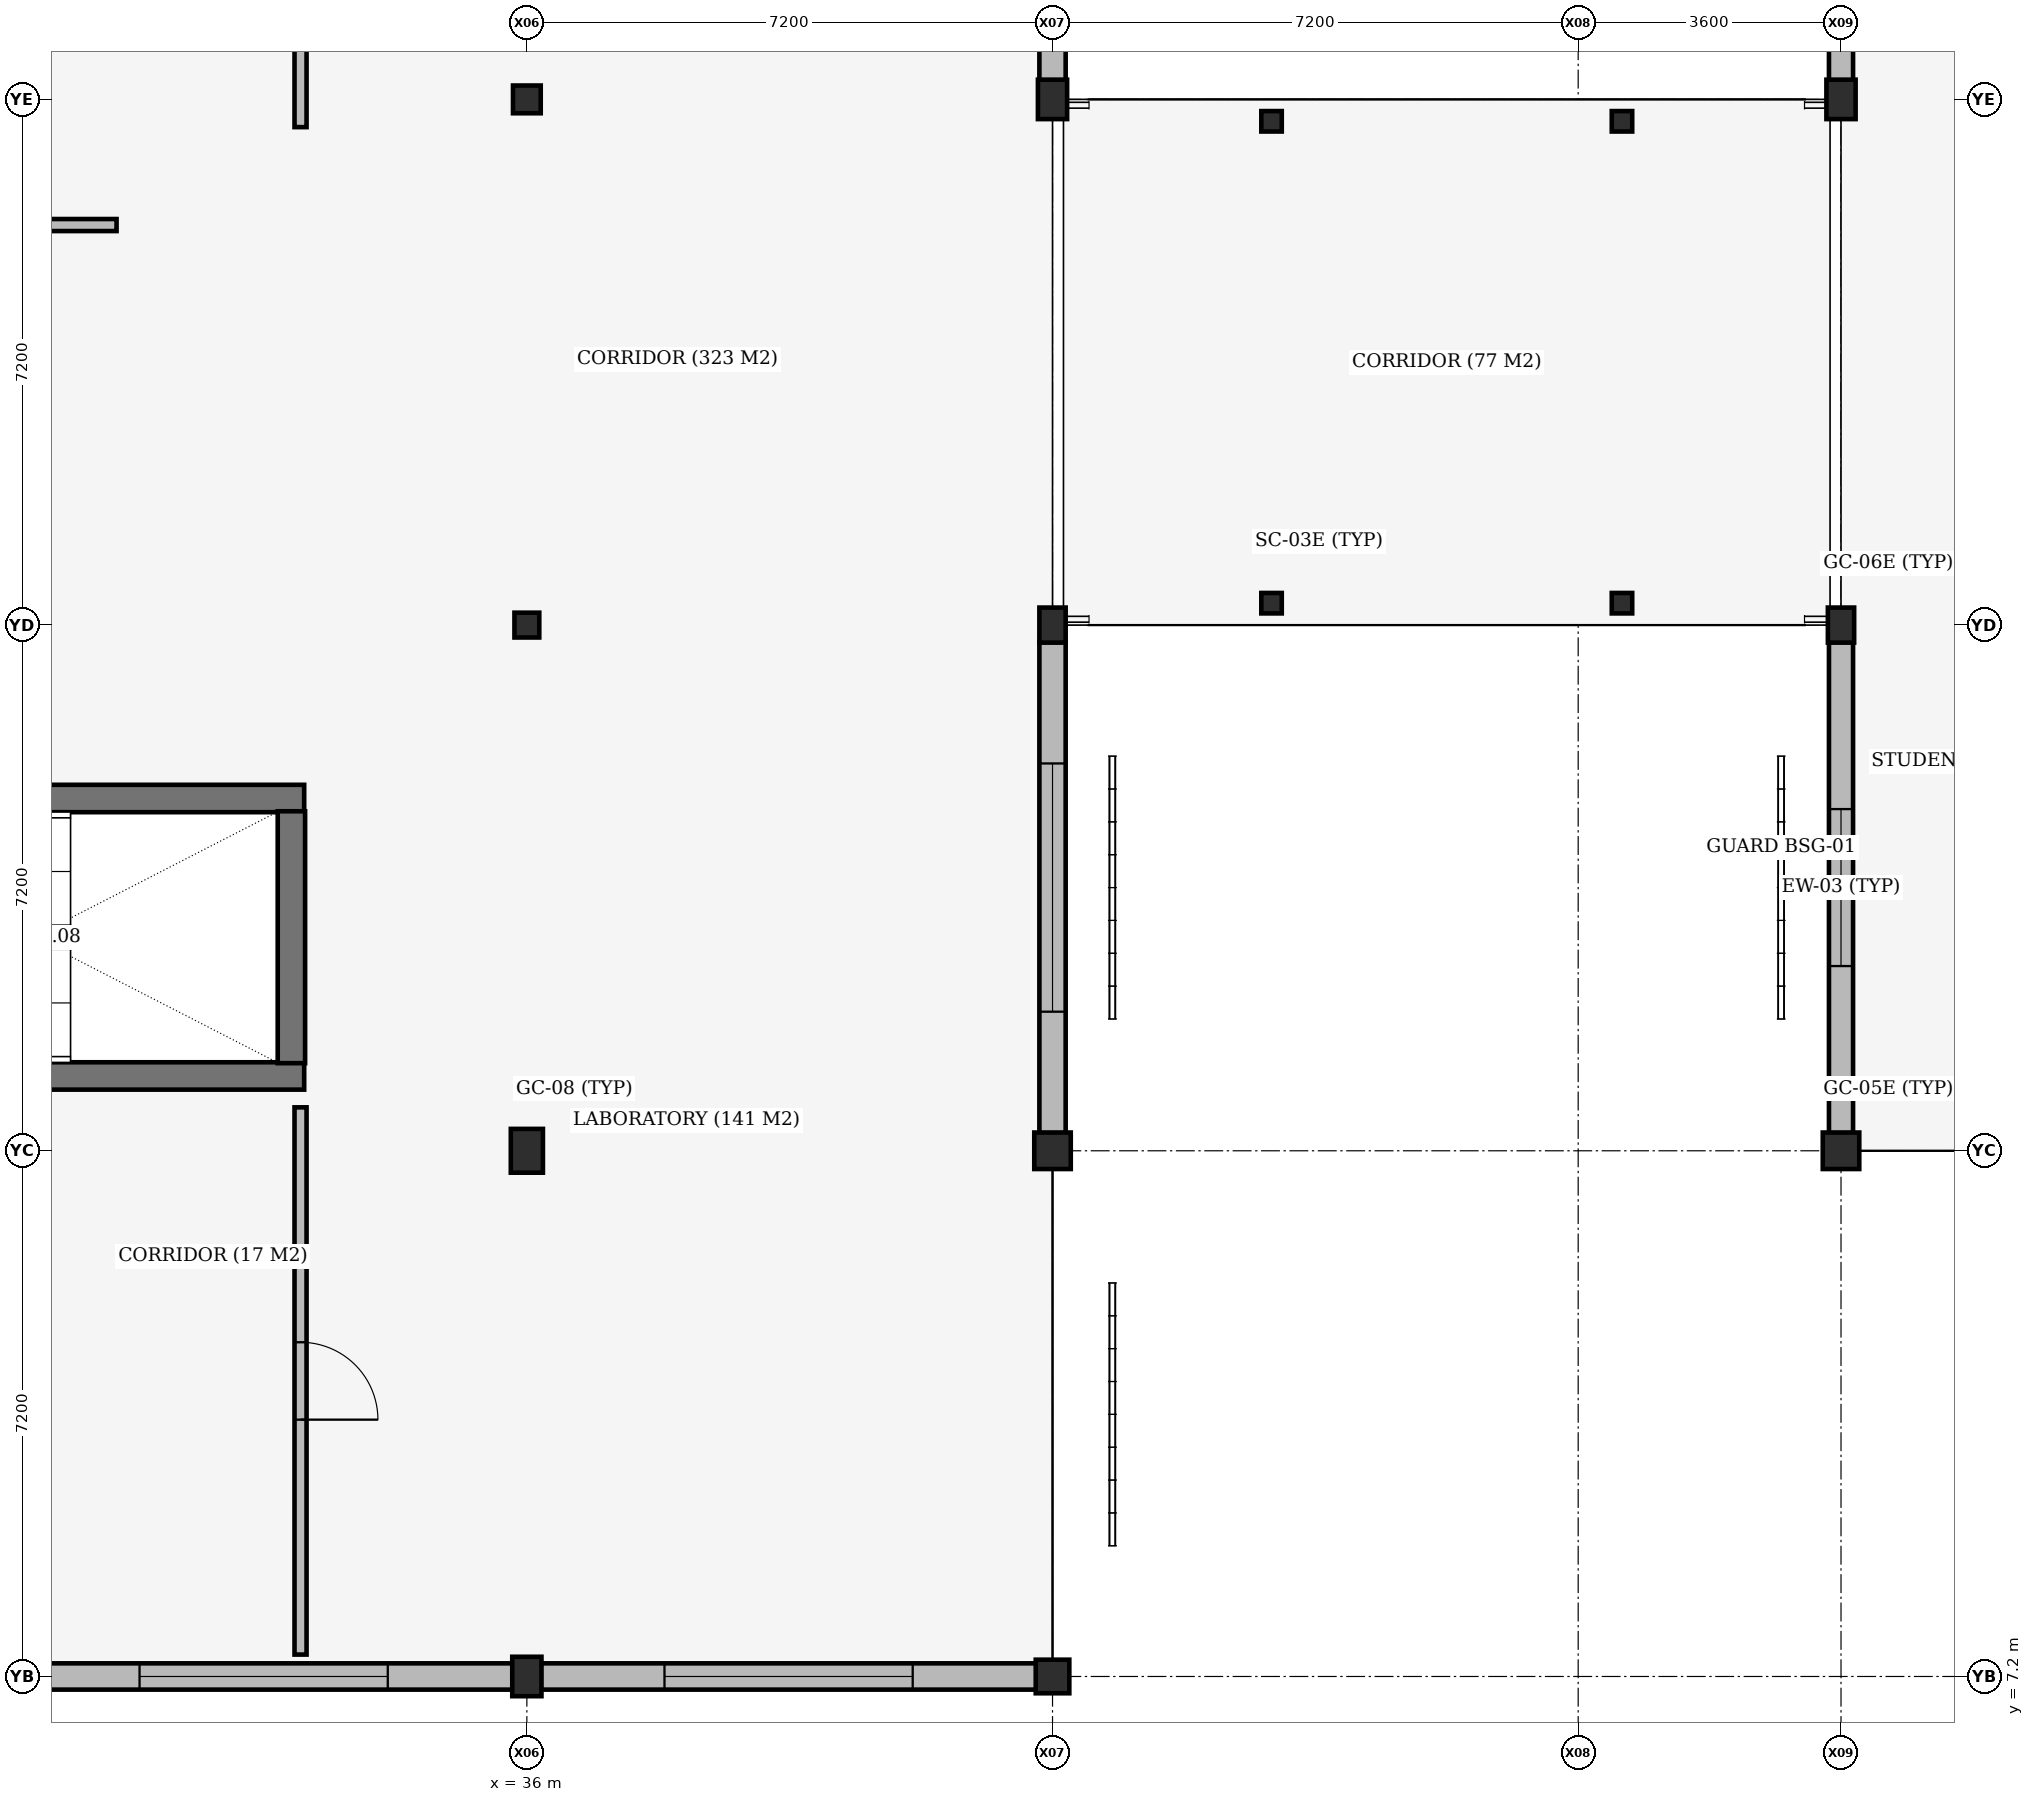
"""IFC4 building model, lengths in metres.
Left out: names, types, materials, properties, quantities, classifications, styles, units other than length and angle.
Written with IfcOpenShell. Run it as: python <this file> out.ifc"""

import sys

from ifc_helpers import new_model, si_unit, direction, frame, frame_2d, origin, origin_2d, place, context, subcontext, project, spatial, rectangle, i_section, extrude, element, fill, save


model = new_model("IFC4")
c1 = context("Model", 3, precision=1e-05, world=origin(), true_north=direction((0.0, 1.0)))
c2 = subcontext(c1, "Body", "Model", "MODEL_VIEW")
j1 = project(units=[si_unit("LENGTHUNIT", "METRE"), si_unit("PLANEANGLEUNIT", "RADIAN")], contexts=[c1])
p1 = place(None, origin())
s1 = spatial("IfcSite", under=j1, at=p1, CompositionType="ELEMENT")
p2 = place(p1, origin())
s2 = spatial("IfcBuilding", under=s1, at=p2, CompositionType="ELEMENT")
p3 = place(p2, frame((0.0, 0.0, 9.6)))
s3 = spatial("IfcBuildingStorey", under=s2, at=p3, CompositionType="ELEMENT", Elevation=9.6)
p4 = place(p3, frame((54.0, 14.4, 0.0), z_axis=(0.0, 0.0, 1.0), x_axis=(1.0, 0.0, 0.0)))
e1 = element("IfcColumn", 1, at=p4, inside=s3, PredefinedType="COLUMN", context=c2, shape_type="SweptSolid", body=[
    extrude(rectangle(XDim=0.5, YDim=0.5, at=origin_2d()), origin(), (0.0, 0.0, 1.0), 3.96),
])
p5 = place(p3, frame((54.0, 21.6, 0.0), z_axis=(0.0, 0.0, 1.0), x_axis=(1.0, 0.0, 0.0)))
e2 = element("IfcColumn", 2, at=p5, inside=s3, PredefinedType="COLUMN", context=c2, shape_type="SweptSolid", body=[
    extrude(rectangle(XDim=0.36, YDim=0.48, at=origin_2d()), origin(), (0.0, 0.0, 1.0), 3.935),
])
p6 = place(p3, frame((54.0, 28.8, 0.0), z_axis=(0.0, 0.0, 1.0), x_axis=(1.0, 0.0, 0.0)))
e3 = element("IfcColumn", 3, at=p6, inside=s3, PredefinedType="COLUMN", context=c2, shape_type="SweptSolid", body=[
    extrude(rectangle(XDim=0.4, YDim=0.54, at=origin_2d()), origin(), (0.0, 0.0, 1.0), 3.935),
])
p7 = place(p3, frame((36.0, 7.2, 0.0), z_axis=(0.0, 0.0, 1.0), x_axis=(1.0, 0.0, 0.0)))
e4 = element("IfcColumn", 4, at=p7, inside=s3, PredefinedType="COLUMN", context=c2, shape_type="SweptSolid", body=[
    extrude(rectangle(XDim=0.4, YDim=0.54, at=origin_2d()), origin(), (0.0, 0.0, 1.0), 3.89),
])
p8 = place(p3, frame((36.0, 14.4, 0.0), z_axis=(0.0, 0.0, 1.0), x_axis=(1.0, 0.0, 0.0)))
e5 = element("IfcColumn", 5, at=p8, inside=s3, PredefinedType="COLUMN", context=c2, shape_type="SweptSolid", body=[
    extrude(rectangle(XDim=0.44, YDim=0.6, at=origin_2d()), origin(), (0.0, 0.0, 1.0), 3.89),
])
p9 = place(p3, frame((36.0, 21.6, 0.0), z_axis=(0.0, 0.0, 1.0), x_axis=(1.0, 0.0, 0.0)))
e6 = element("IfcColumn", 6, at=p9, inside=s3, PredefinedType="COLUMN", context=c2, shape_type="SweptSolid", body=[
    extrude(rectangle(XDim=0.34, YDim=0.34, at=origin_2d()), origin(), (0.0, 0.0, 1.0), 3.89),
])
p10 = place(p3, frame((36.0, 28.8, 0.0), z_axis=(0.0, 0.0, 1.0), x_axis=(1.0, 0.0, 0.0)))
e7 = element("IfcColumn", 7, at=p10, inside=s3, PredefinedType="COLUMN", context=c2, shape_type="SweptSolid", body=[
    extrude(rectangle(XDim=0.38, YDim=0.38, at=origin_2d()), origin(), (0.0, 0.0, 1.0), 3.89),
])
p11 = place(p3, frame((43.2, 7.2, 0.0), z_axis=(0.0, 0.0, 1.0), x_axis=(1.0, 0.0, 0.0)))
e8 = element("IfcColumn", 8, at=p11, inside=s3, PredefinedType="COLUMN", context=c2, shape_type="SweptSolid", body=[
    extrude(rectangle(XDim=0.46, YDim=0.46, at=origin_2d()), origin(), (0.0, 0.0, 1.0), 3.89),
])
p12 = place(p3, frame((43.2, 14.4, 0.0), z_axis=(0.0, 0.0, 1.0), x_axis=(1.0, 0.0, 0.0)))
e9 = element("IfcColumn", 9, at=p12, inside=s3, PredefinedType="COLUMN", context=c2, shape_type="SweptSolid", body=[
    extrude(rectangle(XDim=0.5, YDim=0.5, at=origin_2d()), origin(), (0.0, 0.0, 1.0), 3.89),
])
p13 = place(p3, frame((43.2, 21.6, 0.0), z_axis=(0.0, 0.0, 1.0), x_axis=(1.0, 0.0, 0.0)))
e10 = element("IfcColumn", 10, at=p13, inside=s3, PredefinedType="COLUMN", context=c2, shape_type="SweptSolid", body=[
    extrude(rectangle(XDim=0.36, YDim=0.48, at=origin_2d()), origin(), (0.0, 0.0, 1.0), 3.89),
])
p14 = place(p3, frame((43.2, 28.8, 0.0), z_axis=(0.0, 0.0, 1.0), x_axis=(1.0, 0.0, 0.0)))
e11 = element("IfcColumn", 11, at=p14, inside=s3, PredefinedType="COLUMN", context=c2, shape_type="SweptSolid", body=[
    extrude(rectangle(XDim=0.4, YDim=0.54, at=origin_2d()), origin(), (0.0, 0.0, 1.0), 3.89),
])
for number, where, z_axis, x_axis in (
    (12, (46.2, 21.9, 0.0), (0.0, 0.0, 1.0), (1.0, 0.0, 0.0)),
    (13, (51.0, 21.9, 0.0), (0.0, 0.0, 1.0), (1.0, 0.0, 0.0)),
    (14, (46.2, 28.5, 0.0), (0.0, 0.0, 1.0), (1.0, 0.0, 0.0)),
    (15, (51.0, 28.5, 0.0), (0.0, 0.0, 1.0), (1.0, 0.0, 0.0)),
):
    element("IfcColumn", number, at=place(p3, frame(where, z_axis=z_axis, x_axis=x_axis)), inside=s3, PredefinedType="COLUMN", context=c2, shape_type="SweptSolid", body=[
        extrude(i_section(OverallWidth=0.28, OverallDepth=0.28, WebThickness=0.01, FlangeThickness=0.018, FilletRadius=0.024, at=origin_2d()), origin(), (0.0, 0.0, 1.0), 3.935),
    ])
for number, where, z_axis, x_axis in (
    (16, (23.85, 15.425, 0.0), (0.0, 0.0, 1.0), (1.0, 0.0, 0.0)),
    (17, (32.95, 19.225, 0.0), (0.0, 0.0, 1.0), (-1.0, 0.0, 0.0)),
):
    element("IfcWall", number, at=place(p3, frame(where, z_axis=z_axis, x_axis=x_axis)), inside=s3, PredefinedType="SHEAR", context=c2, shape_type="SweptSolid", body=[
        extrude(rectangle(XDim=9.1, YDim=0.375, at=frame_2d((4.55, 0.0))), origin(), (0.0, 0.0, 1.0), 3.89),
    ])
p15 = place(p3, frame((32.775, 15.6, 0.0), z_axis=(0.0, 0.0, 1.0), x_axis=(0.0, 1.0, 0.0)))
e18 = element("IfcWall", 18, at=p15, inside=s3, PredefinedType="SHEAR", context=c2, shape_type="SweptSolid", body=[
    extrude(rectangle(XDim=3.45, YDim=0.375, at=frame_2d((1.725, 0.0))), origin(), (0.0, 0.0, 1.0), 3.89),
])
p16 = place(p3, frame((54.0, 14.642, 0.0), z_axis=(0.0, 0.0, 1.0), x_axis=(0.0, 1.0, 0.0)))
e19 = element("IfcWall", 19, at=p16, inside=s3, PredefinedType="STANDARD", context=c2, shape_type="SweptSolid", body=[
    extrude(rectangle(XDim=6.726, YDim=0.33, at=frame_2d((3.363, 0.0))), origin(), (0.0, 0.0, 1.0), 3.935),
])
p17 = place(p16, frame((2.288, 0.0, 0.85)))
e20 = element("IfcOpeningElement", 20, at=p17, cuts=e19, PredefinedType="OPENING", context=c2, shape_type="SweptSolid", body=[
    extrude(rectangle(XDim=2.15, YDim=2.7, at=frame_2d((1.075, 1.35))), frame((0.0, 0.175, 0.0), z_axis=(0.0, -1.0, 0.0), x_axis=(1.0, 0.0, 0.0)), (0.0, 0.0, 1.0), 0.35),
])
p18 = place(p3, frame((54.0, 29.062, 0.0), z_axis=(0.0, 0.0, 1.0), x_axis=(0.0, 1.0, 0.0)))
e21 = element("IfcWall", 21, at=p18, inside=s3, PredefinedType="STANDARD", context=c2, shape_type="SweptSolid", body=[
    extrude(rectangle(XDim=6.646, YDim=0.33, at=frame_2d((3.323, 0.0))), origin(), (0.0, 0.0, 1.0), 3.295),
])
p19 = place(p18, frame((1.623, 0.0, 0.9)))
e22 = element("IfcOpeningElement", 22, at=p19, cuts=e21, PredefinedType="OPENING", context=c2, shape_type="SweptSolid", body=[
    extrude(rectangle(XDim=3.4, YDim=1.5, at=frame_2d((1.7, 0.75))), frame((0.0, 0.175, 0.0), z_axis=(0.0, -1.0, 0.0), x_axis=(1.0, 0.0, 0.0)), (0.0, 0.0, 1.0), 0.35),
])
p20 = place(p3, frame((35.808, 7.2, 0.0), z_axis=(0.0, 0.0, 1.0), x_axis=(-1.0, 0.0, 0.0)))
e23 = element("IfcWall", 23, at=p20, inside=s3, PredefinedType="STANDARD", context=c2, shape_type="SweptSolid", body=[
    extrude(rectangle(XDim=6.826, YDim=0.36, at=frame_2d((3.413, 0.0))), origin(), (0.0, 0.0, 1.0), 3.15),
])
p21 = place(p20, frame((1.713, 0.0, 0.9)))
e24 = element("IfcOpeningElement", 24, at=p21, cuts=e23, PredefinedType="OPENING", context=c2, shape_type="SweptSolid", body=[
    extrude(rectangle(XDim=3.4, YDim=1.5, at=frame_2d((1.7, 0.75))), frame((0.0, 0.19, 0.0), z_axis=(0.0, -1.0, 0.0), x_axis=(1.0, 0.0, 0.0)), (0.0, 0.0, 1.0), 0.38),
])
p22 = place(p3, frame((42.978, 7.2, 0.0), z_axis=(0.0, 0.0, 1.0), x_axis=(-1.0, 0.0, 0.0)))
e25 = element("IfcWall", 25, at=p22, inside=s3, PredefinedType="STANDARD", context=c2, shape_type="SweptSolid", body=[
    extrude(rectangle(XDim=6.786, YDim=0.36, at=frame_2d((3.393, 0.0))), origin(), (0.0, 0.0, 1.0), 3.37),
])
p23 = place(p22, frame((1.693, 0.0, 0.9)))
e26 = element("IfcOpeningElement", 26, at=p23, cuts=e25, PredefinedType="OPENING", context=c2, shape_type="SweptSolid", body=[
    extrude(rectangle(XDim=3.4, YDim=1.5, at=frame_2d((1.7, 0.75))), frame((0.0, 0.19, 0.0), z_axis=(0.0, -1.0, 0.0), x_axis=(1.0, 0.0, 0.0)), (0.0, 0.0, 1.0), 0.38),
])
p24 = place(p3, frame((43.2, 21.368, 0.0), z_axis=(0.0, 0.0, 1.0), x_axis=(0.0, -1.0, 0.0)))
e27 = element("IfcWall", 27, at=p24, inside=s3, PredefinedType="STANDARD", context=c2, shape_type="SweptSolid", body=[
    extrude(rectangle(XDim=6.726, YDim=0.36, at=frame_2d((3.363, 0.0))), origin(), (0.0, 0.0, 1.0), 3.15),
])
p25 = place(p24, frame((1.663, 0.0, 0.9)))
e28 = element("IfcOpeningElement", 28, at=p25, cuts=e27, PredefinedType="OPENING", context=c2, shape_type="SweptSolid", body=[
    extrude(rectangle(XDim=3.4, YDim=1.5, at=frame_2d((1.7, 0.75))), frame((0.0, 0.19, 0.0), z_axis=(0.0, -1.0, 0.0), x_axis=(1.0, 0.0, 0.0)), (0.0, 0.0, 1.0), 0.38),
])
p26 = place(p3, frame((43.2, 35.708, 0.0), z_axis=(0.0, 0.0, 1.0), x_axis=(0.0, -1.0, 0.0)))
e29 = element("IfcWall", 29, at=p26, inside=s3, PredefinedType="STANDARD", context=c2, shape_type="SweptSolid", body=[
    extrude(rectangle(XDim=6.646, YDim=0.36, at=frame_2d((3.323, 0.0))), origin(), (0.0, 0.0, 1.0), 3.31),
])
p27 = place(p26, frame((1.623, 0.0, 0.9)))
e30 = element("IfcOpeningElement", 30, at=p27, cuts=e29, PredefinedType="OPENING", context=c2, shape_type="SweptSolid", body=[
    extrude(rectangle(XDim=3.4, YDim=1.5, at=frame_2d((1.7, 0.75))), frame((0.0, 0.19, 0.0), z_axis=(0.0, -1.0, 0.0), x_axis=(1.0, 0.0, 0.0)), (0.0, 0.0, 1.0), 0.38),
])
p28 = place(p3, frame((11.47, 27.079, 0.0), z_axis=(0.0, 0.0, 1.0), x_axis=(1.0, 0.0, 0.0)))
e31 = element("IfcWall", 31, at=p28, inside=s3, PredefinedType="PARTITIONING", context=c2, shape_type="SweptSolid", body=[
    extrude(rectangle(XDim=18.91, YDim=0.165, at=frame_2d((9.455, 0.0))), origin(), (0.0, 0.0, 1.0), 3.15),
])
p29 = place(p3, frame((32.9, 7.5, 0.0), z_axis=(0.0, 0.0, 1.0), x_axis=(0.0, 1.0, 0.0)))
e32 = element("IfcWall", 32, at=p29, inside=s3, PredefinedType="PARTITIONING", context=c2, shape_type="SweptSolid", body=[
    extrude(rectangle(XDim=7.495, YDim=0.165, at=frame_2d((3.748, 0.0))), origin(), (0.0, 0.0, 1.0), 3.37),
])
p30 = place(p29, frame((3.218, 0.0, 0.0)))
e33 = element("IfcOpeningElement", 33, at=p30, cuts=e32, PredefinedType="OPENING", context=c2, shape_type="SweptSolid", body=[
    extrude(rectangle(XDim=1.06, YDim=2.2, at=frame_2d((0.53, 1.1))), frame((0.0, 0.093, 0.0), z_axis=(0.0, -1.0, 0.0), x_axis=(1.0, 0.0, 0.0)), (0.0, 0.0, 1.0), 0.185),
])
p31 = place(p3, frame((32.9, 28.42, 0.0), z_axis=(0.0, 0.0, 1.0), x_axis=(0.0, 1.0, 0.0)))
e34 = element("IfcWall", 34, at=p31, inside=s3, PredefinedType="PARTITIONING", context=c2, shape_type="SweptSolid", body=[
    extrude(rectangle(XDim=23.133, YDim=0.165, at=frame_2d((11.566, 0.0))), origin(), (0.0, 0.0, 1.0), 3.21),
])
p32 = place(p31, frame((11.042, 0.0, 0.0)))
e35 = element("IfcOpeningElement", 35, at=p32, cuts=e34, PredefinedType="OPENING", context=c2, shape_type="SweptSolid", body=[
    extrude(rectangle(XDim=1.05, YDim=2.2, at=frame_2d((0.525, 1.1))), frame((0.0, 0.093, 0.0), z_axis=(0.0, -1.0, 0.0), x_axis=(1.0, 0.0, 0.0)), (0.0, 0.0, 1.0), 0.185),
])
p33 = place(p17, origin())
e36 = element("IfcWindow", 36, at=p33, inside=s3, PartitioningType="DOUBLE_PANEL_VERTICAL", PredefinedType="WINDOW", context=c2, shape_type="SweptSolid", body=[
    extrude(rectangle(XDim=2.15, YDim=2.7, at=frame_2d((1.075, 1.35))), frame((0.0, 0.03, 0.0), z_axis=(0.0, -1.0, 0.0), x_axis=(1.0, 0.0, 0.0)), (0.0, 0.0, 1.0), 0.06),
])
fill(e20, e36)
p34 = place(p21, origin())
e37 = element("IfcWindow", 37, at=p34, inside=s3, PartitioningType="DOUBLE_PANEL_VERTICAL", PredefinedType="WINDOW", context=c2, shape_type="SweptSolid", body=[
    extrude(rectangle(XDim=3.4, YDim=1.5, at=frame_2d((1.7, 0.75))), frame((0.0, 0.03, 0.0), z_axis=(0.0, -1.0, 0.0), x_axis=(1.0, 0.0, 0.0)), (0.0, 0.0, 1.0), 0.06),
])
fill(e24, e37)
p35 = place(p23, origin())
e38 = element("IfcWindow", 38, at=p35, inside=s3, PartitioningType="DOUBLE_PANEL_VERTICAL", PredefinedType="WINDOW", context=c2, shape_type="SweptSolid", body=[
    extrude(rectangle(XDim=3.4, YDim=1.5, at=frame_2d((1.7, 0.75))), frame((0.0, 0.03, 0.0), z_axis=(0.0, -1.0, 0.0), x_axis=(1.0, 0.0, 0.0)), (0.0, 0.0, 1.0), 0.06),
])
fill(e26, e38)
p36 = place(p25, origin())
e39 = element("IfcWindow", 39, at=p36, inside=s3, PartitioningType="DOUBLE_PANEL_VERTICAL", PredefinedType="WINDOW", context=c2, shape_type="SweptSolid", body=[
    extrude(rectangle(XDim=3.4, YDim=1.5, at=frame_2d((1.7, 0.75))), frame((0.0, 0.03, 0.0), z_axis=(0.0, -1.0, 0.0), x_axis=(1.0, 0.0, 0.0)), (0.0, 0.0, 1.0), 0.06),
])
fill(e28, e39)
p37 = place(p30, origin())
e40 = element("IfcDoor", 40, at=p37, inside=s3, OperationType="SINGLE_SWING_RIGHT", PredefinedType="DOOR", context=c2, shape_type="SweptSolid", body=[
    extrude(rectangle(XDim=1.06, YDim=2.2, at=frame_2d((0.53, 1.1))), frame((0.0, 0.025, 0.0), z_axis=(0.0, -1.0, 0.0), x_axis=(1.0, 0.0, 0.0)), (0.0, 0.0, 1.0), 0.05),
])
fill(e33, e40)
save(model, sys.argv[1])
